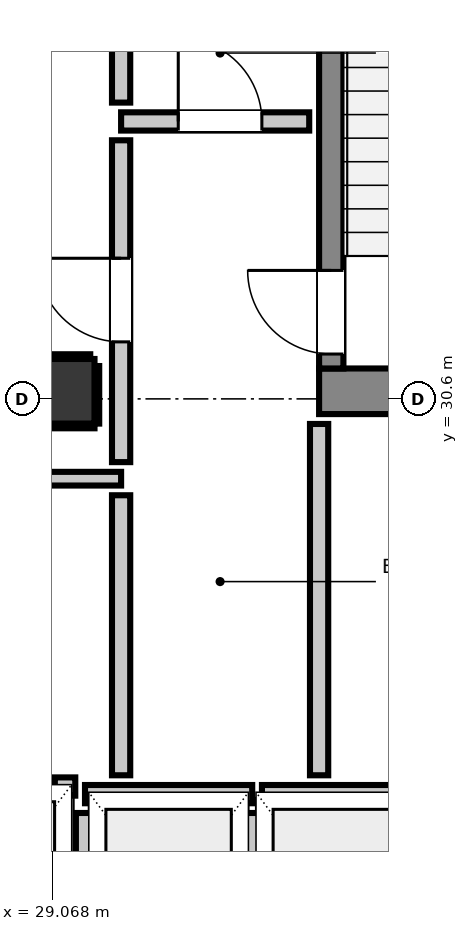
"""IFC4 building model, lengths in metres.
Left out: names, types, materials, properties, quantities, classifications, styles, units other than length and angle.
Written with IfcOpenShell. Run it as: python <this file> out.ifc"""

import sys

from ifc_helpers import new_model, si_unit, direction, frame, frame_2d, origin, origin_2d, place, context, subcontext, project, spatial, rectangle, extrude, element, fill, save


model = new_model("IFC4")
c1 = context("Model", 3, precision=1e-05, world=origin(), true_north=direction((0.0, 1.0)))
c2 = subcontext(c1, "Body", "Model", "MODEL_VIEW")
j1 = project(units=[si_unit("LENGTHUNIT", "METRE"), si_unit("PLANEANGLEUNIT", "RADIAN")], contexts=[c1])
p1 = place(None, origin())
s1 = spatial("IfcSite", under=j1, at=p1, CompositionType="ELEMENT")
p2 = place(p1, origin())
s2 = spatial("IfcBuilding", under=s1, at=p2, CompositionType="ELEMENT")
p3 = place(p2, frame((0.0, 0.0, 231.28)))
s3 = spatial("IfcBuildingStorey", under=s2, at=p3, CompositionType="ELEMENT", Elevation=231.28)
p4 = place(p3, frame((32.58, 30.7, 0.0), z_axis=(0.0, 0.0, 1.0), x_axis=(1.0, 0.0, 0.0)))
e1 = element("IfcWall", 1, at=p4, inside=s3, PredefinedType="SHEAR", context=c2, shape_type="SweptSolid", body=[
    extrude(rectangle(XDim=3.54, YDim=0.6, at=frame_2d((1.77, 0.0))), origin(), (0.0, 0.0, 1.0), 3.32),
])
p5 = place(p3, frame((32.74, 31.0, 0.0), z_axis=(0.0, 0.0, 1.0), x_axis=(0.0, 1.0, 0.0)))
e2 = element("IfcWall", 2, at=p5, inside=s3, PredefinedType="SHEAR", context=c2, shape_type="SweptSolid", body=[
    extrude(rectangle(XDim=7.8, YDim=0.32, at=frame_2d((3.9, 0.0))), origin(), (0.0, 0.0, 1.0), 3.32),
])
p6 = place(p5, frame((0.19, 0.0, 0.0)))
e3 = element("IfcOpeningElement", 3, at=p6, cuts=e2, PredefinedType="OPENING", context=c2, shape_type="SweptSolid", body=[
    extrude(rectangle(XDim=1.1, YDim=2.15, at=frame_2d((0.55, 1.075))), frame((0.0, 0.17, 0.0), z_axis=(0.0, -1.0, 0.0), x_axis=(1.0, 0.0, 0.0)), (0.0, 0.0, 1.0), 0.34),
])
p7 = place(p3, frame((29.2, 30.7, 0.0), z_axis=(0.0, 0.0, 1.0), x_axis=(1.0, 0.0, 0.0)))
e4 = element("IfcColumn", 4, at=p7, inside=s3, PredefinedType="COLUMN", context=c2, shape_type="SweptSolid", body=[
    extrude(rectangle(XDim=0.85, YDim=0.85, at=origin_2d()), origin(), (0.0, 0.0, 1.0), 3.32),
])
p8 = place(p3, frame((29.5, 25.4, 0.0), z_axis=(0.0, 0.0, 1.0), x_axis=(1.0, 0.0, 0.0)))
e5 = element("IfcWall", 5, at=p8, inside=s3, PredefinedType="PARTITIONING", context=c2, shape_type="SweptSolid", body=[
    extrude(rectangle(XDim=2.2, YDim=0.24, at=frame_2d((1.1, 0.0))), origin(), (0.0, 0.0, 1.0), 3.1),
])
p9 = place(p3, frame((29.5, 22.848, 0.0), z_axis=(0.0, 0.0, 1.0), x_axis=(0.0, 1.0, 0.0)))
e6 = element("IfcWall", 6, at=p9, inside=s3, PredefinedType="PARTITIONING", context=c2, shape_type="SweptSolid", body=[
    extrude(rectangle(XDim=2.304, YDim=0.24, at=frame_2d((1.152, 0.0))), origin(), (0.0, 0.0, 1.0), 2.335),
])
p10 = place(p3, frame((31.7, 22.848, 0.0), z_axis=(0.0, 0.0, 1.0), x_axis=(0.0, 1.0, 0.0)))
e7 = element("IfcWall", 7, at=p10, inside=s3, PredefinedType="PARTITIONING", context=c2, shape_type="SweptSolid", body=[
    extrude(rectangle(XDim=2.304, YDim=0.24, at=frame_2d((1.152, 0.0))), origin(), (0.0, 0.0, 1.0), 3.1),
])
p11 = place(p3, frame((31.828, 25.4, 0.0), z_axis=(0.0, 0.0, 1.0), x_axis=(1.0, 0.0, 0.0)))
e8 = element("IfcWall", 8, at=p11, inside=s3, PredefinedType="PARTITIONING", context=c2, shape_type="SweptSolid", body=[
    extrude(rectangle(XDim=2.072, YDim=0.24, at=frame_2d((1.036, 0.0))), origin(), (0.0, 0.0, 1.0), 3.1),
])
p12 = place(p3, frame((29.103, 25.5, 0.0), z_axis=(0.0, 0.0, 1.0), x_axis=(1.0, 0.0, 0.0)))
e9 = element("IfcWall", 9, at=p12, inside=s3, PredefinedType="PARTITIONING", context=c2, shape_type="SweptSolid", body=[
    extrude(rectangle(XDim=0.269, YDim=0.24, at=frame_2d((0.135, 0.0))), origin(), (0.0, 0.0, 1.0), 3.1),
])
p13 = place(p3, frame((29.975, 34.25, 0.0), z_axis=(0.0, 0.0, 1.0), x_axis=(1.0, 0.0, 0.0)))
e10 = element("IfcWall", 10, at=p13, inside=s3, PredefinedType="PARTITIONING", context=c2, shape_type="SweptSolid", body=[
    extrude(rectangle(XDim=2.475, YDim=0.24, at=frame_2d((1.237, 0.0))), origin(), (0.0, 0.0, 1.0), 3.1),
])
p14 = place(p13, frame((0.752, 0.0, 0.0)))
e11 = element("IfcOpeningElement", 11, at=p14, cuts=e10, PredefinedType="OPENING", context=c2, shape_type="SweptSolid", body=[
    extrude(rectangle(XDim=1.1, YDim=2.15, at=frame_2d((0.55, 1.075))), frame((0.0, 0.13, 0.0), z_axis=(0.0, -1.0, 0.0), x_axis=(1.0, 0.0, 0.0)), (0.0, 0.0, 1.0), 0.26),
])
p15 = place(p3, frame((28.593, 29.55, 0.0), z_axis=(0.0, 0.0, 1.0), x_axis=(1.0, 0.0, 0.0)))
e12 = element("IfcWall", 12, at=p15, inside=s3, PredefinedType="PARTITIONING", context=c2, shape_type="SweptSolid", body=[
    extrude(rectangle(XDim=1.382, YDim=0.18, at=frame_2d((0.691, 0.0))), origin(), (0.0, 0.0, 1.0), 3.1),
])
p16 = place(p3, frame((29.975, 25.648, 0.0), z_axis=(0.0, 0.0, 1.0), x_axis=(0.0, 1.0, 0.0)))
e13 = element("IfcWall", 13, at=p16, inside=s3, PredefinedType="PARTITIONING", context=c2, shape_type="SweptSolid", body=[
    extrude(rectangle(XDim=3.684, YDim=0.24, at=frame_2d((1.842, 0.0))), origin(), (0.0, 0.0, 1.0), 3.1),
])
p17 = place(p3, frame((29.975, 29.768, 0.0), z_axis=(0.0, 0.0, 1.0), x_axis=(0.0, 1.0, 0.0)))
e14 = element("IfcWall", 14, at=p17, inside=s3, PredefinedType="PARTITIONING", context=c2, shape_type="SweptSolid", body=[
    extrude(rectangle(XDim=4.234, YDim=0.24, at=frame_2d((2.117, 0.0))), origin(), (0.0, 0.0, 1.0), 3.1),
])
p18 = place(p17, frame((1.582, 0.0, 0.0)))
e15 = element("IfcOpeningElement", 15, at=p18, cuts=e14, PredefinedType="OPENING", context=c2, shape_type="SweptSolid", body=[
    extrude(rectangle(XDim=1.1, YDim=2.15, at=frame_2d((0.55, 1.075))), frame((0.0, 0.13, 0.0), z_axis=(0.0, -1.0, 0.0), x_axis=(1.0, 0.0, 0.0)), (0.0, 0.0, 1.0), 0.26),
])
p19 = place(p3, frame((29.975, 34.498, 0.0), z_axis=(0.0, 0.0, 1.0), x_axis=(0.0, 1.0, 0.0)))
e16 = element("IfcWall", 16, at=p19, inside=s3, PredefinedType="PARTITIONING", context=c2, shape_type="SweptSolid", body=[
    extrude(rectangle(XDim=0.924, YDim=0.24, at=frame_2d((0.462, 0.0))), origin(), (0.0, 0.0, 1.0), 3.1),
])
p20 = place(p3, frame((32.58, 25.648, 0.0), z_axis=(0.0, 0.0, 1.0), x_axis=(0.0, 1.0, 0.0)))
e17 = element("IfcWall", 17, at=p20, inside=s3, PredefinedType="PARTITIONING", context=c2, shape_type="SweptSolid", body=[
    extrude(rectangle(XDim=4.622, YDim=0.24, at=frame_2d((2.311, 0.0))), origin(), (0.0, 0.0, 1.0), 3.1),
])
p21 = place(p3, frame((28.775, 30.243, 0.0), z_axis=(0.0, 0.0, 1.0), x_axis=(1.0, 0.0, 0.0)))
e18 = element("IfcWall", 18, at=p21, inside=s3, PredefinedType="PARTITIONING", context=c2, shape_type="SweptSolid", body=[
    extrude(rectangle(XDim=0.85, YDim=0.06, at=frame_2d((0.425, 0.0))), origin(), (0.0, 0.0, 1.0), 1.45),
])
p22 = place(p3, frame((28.775, 31.157, 0.0), z_axis=(0.0, 0.0, 1.0), x_axis=(1.0, 0.0, 0.0)))
e19 = element("IfcWall", 19, at=p22, inside=s3, PredefinedType="PARTITIONING", context=c2, shape_type="SweptSolid", body=[
    extrude(rectangle(XDim=0.794, YDim=0.06, at=frame_2d((0.397, 0.0))), origin(), (0.0, 0.0, 1.0), 1.45),
])
p23 = place(p3, frame((29.657, 30.275, 0.0), z_axis=(0.0, 0.0, 1.0), x_axis=(0.0, 1.0, 0.0)))
e20 = element("IfcWall", 20, at=p23, inside=s3, PredefinedType="PARTITIONING", context=c2, shape_type="SweptSolid", body=[
    extrude(rectangle(XDim=0.757, YDim=0.06, at=frame_2d((0.378, 0.0))), origin(), (0.0, 0.0, 1.0), 1.45),
])
p24 = place(p6, origin())
e21 = element("IfcDoor", 21, at=p24, inside=s3, OperationType="SINGLE_SWING_RIGHT", PredefinedType="DOOR", context=c2, shape_type="SweptSolid", body=[
    extrude(rectangle(XDim=1.1, YDim=2.15, at=frame_2d((0.55, 1.075))), frame((0.0, 0.025, 0.0), z_axis=(0.0, -1.0, 0.0), x_axis=(1.0, 0.0, 0.0)), (0.0, 0.0, 1.0), 0.05),
])
fill(e3, e21)
p25 = place(p18, origin())
e22 = element("IfcDoor", 22, at=p25, inside=s3, OperationType="SINGLE_SWING_RIGHT", PredefinedType="DOOR", context=c2, shape_type="SweptSolid", body=[
    extrude(rectangle(XDim=1.1, YDim=2.15, at=frame_2d((0.55, 1.075))), frame((0.0, 0.025, 0.0), z_axis=(0.0, -1.0, 0.0), x_axis=(1.0, 0.0, 0.0)), (0.0, 0.0, 1.0), 0.05),
])
fill(e15, e22)
p26 = place(p14, origin())
e23 = element("IfcDoor", 23, at=p26, inside=s3, OperationType="SINGLE_SWING_LEFT", PredefinedType="DOOR", context=c2, shape_type="SweptSolid", body=[
    extrude(rectangle(XDim=1.1, YDim=2.15, at=frame_2d((0.55, 1.075))), frame((0.0, 0.025, 0.0), z_axis=(0.0, -1.0, 0.0), x_axis=(1.0, 0.0, 0.0)), (0.0, 0.0, 1.0), 0.05),
])
fill(e11, e23)
save(model, sys.argv[1])
